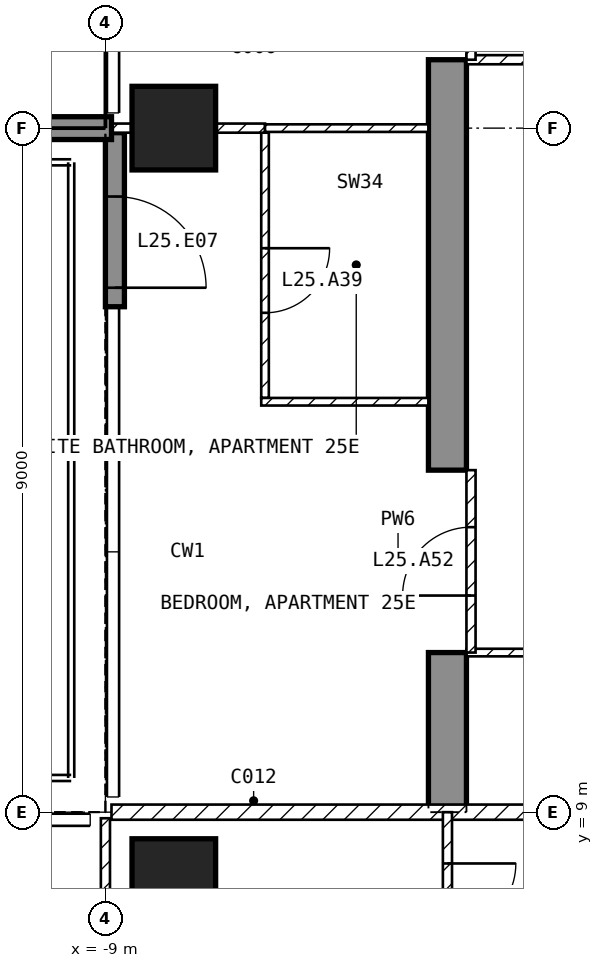
"""IFC4 building model, lengths in metres.
Left out: names, types, materials, properties, quantities, classifications, styles, units other than length and angle.
Written with IfcOpenShell. Run it as: python <this file> out.ifc"""

import sys

from ifc_helpers import new_model, si_unit, direction, frame, frame_2d, origin, origin_2d, place, context, subcontext, project, spatial, polyline, rectangle, outline, extrude, element, fill, save


model = new_model("IFC4")
c1 = context("Model", 3, precision=1e-05, world=origin(), true_north=direction((0.0, 1.0)))
c2 = subcontext(c1, "Body", "Model", "MODEL_VIEW")
j1 = project(units=[si_unit("LENGTHUNIT", "METRE"), si_unit("PLANEANGLEUNIT", "RADIAN")], contexts=[c1])
p1 = place(None, origin())
s1 = spatial("IfcSite", under=j1, at=p1, CompositionType="ELEMENT")
p2 = place(p1, origin())
s2 = spatial("IfcBuilding", under=s1, at=p2, CompositionType="ELEMENT")
p3 = place(p2, frame((0.0, 0.0, 109.4)))
s3 = spatial("IfcBuildingStorey", under=s2, at=p3, CompositionType="ELEMENT", Elevation=109.4)
for number, where, z_axis, x_axis in (
    (1, (-8.1, 8.1, -0.25), (0.0, 0.0, 1.0), (1.0, 0.0, 0.0)),
    (2, (-8.1, 18.0, -0.25), (0.0, 0.0, 1.0), (1.0, 0.0, 0.0)),
):
    element("IfcColumn", number, at=place(p3, frame(where, z_axis=z_axis, x_axis=x_axis)), inside=s3, PredefinedType="COLUMN", context=c2, shape_type="SweptSolid", body=[
        extrude(rectangle(XDim=1.1, YDim=1.1, at=origin_2d()), origin(), (0.0, 0.0, 1.0), 3.5),
    ])
p4 = place(p3, frame((-4.75, 9.0, -0.25), z_axis=(1.0, 0.0, 0.0), x_axis=(0.0, 1.0, 0.0)))
e3 = element("IfcWall", 3, at=p4, inside=s3, PredefinedType="SHEAR", context=c2, shape_type="SweptSolid", body=[
    extrude(outline(polyline([(0.0, 0.0), (2.1, 0.0), (2.1, 2.65), (4.5, 2.65), (4.5, 0.0), (9.9, 0.0), (9.9, 2.65), (12.3, 2.65), (12.3, 0.0), (16.55, 0.0), (16.55, 3.5), (0.0, 3.5), (0.0, 0.0)])), origin(), (0.0, 0.0, 1.0), 0.5),
])
p5 = place(p3, frame((-8.875, 17.94, 0.0), z_axis=(0.0, 0.0, 1.0), x_axis=(0.0, -1.0, 0.0)))
e4 = element("IfcWall", 4, at=p5, inside=s3, PredefinedType="SOLIDWALL", context=c2, shape_type="SweptSolid", body=[
    extrude(rectangle(XDim=2.29, YDim=0.25, at=frame_2d((1.145, 0.0))), origin(), (0.0, 0.0, 1.0), 3.25),
])
p6 = place(p5, frame((0.84, 0.0, 0.0)))
e5 = element("IfcOpeningElement", 5, at=p6, cuts=e4, PredefinedType="OPENING", context=c2, shape_type="SweptSolid", body=[
    extrude(rectangle(XDim=1.2, YDim=2.4, at=frame_2d((0.6, 1.2))), frame((0.0, 0.135, 0.0), z_axis=(0.0, -1.0, 0.0), x_axis=(1.0, 0.0, 0.0)), (0.0, 0.0, 1.0), 0.27),
])
p7 = place(p3, frame((-8.92, 18.0, 0.0), z_axis=(0.0, 0.0, 1.0), x_axis=(-1.0, 0.0, 0.0)))
e6 = element("IfcWall", 6, at=p7, inside=s3, PredefinedType="SOLIDWALL", context=c2, shape_type="SweptSolid", body=[
    extrude(rectangle(XDim=2.82, YDim=0.3, at=frame_2d((1.41, 0.0))), origin(), (0.0, 0.0, 1.0), 3.25),
])
p8 = place(p3, frame((-8.92, 9.0, 0.0), z_axis=(0.0, 0.0, 1.0), x_axis=(1.0, 0.0, 0.0)))
e7 = element("IfcWall", 7, at=p8, inside=s3, PredefinedType="PARTITIONING", context=c2, shape_type="SweptSolid", body=[
    extrude(rectangle(XDim=17.84, YDim=0.2, at=frame_2d((8.92, 0.0))), origin(), (0.0, 0.0, 1.0), 3.25),
])
p9 = place(p8, frame((8.42, 0.0, 0.0)))
e8 = element("IfcOpeningElement", 8, at=p9, cuts=e7, PredefinedType="OPENING", context=c2, shape_type="SweptSolid", body=[
    extrude(rectangle(XDim=1.0, YDim=2.1, at=frame_2d((0.5, 1.05))), frame((0.0, 0.11, 0.0), z_axis=(0.0, -1.0, 0.0), x_axis=(1.0, 0.0, 0.0)), (0.0, 0.0, 1.0), 0.22),
])
p10 = place(p3, frame((-9.0, 8.92, 0.0), z_axis=(0.0, 0.0, 1.0), x_axis=(0.0, -1.0, 0.0)))
e9 = element("IfcWall", 9, at=p10, inside=s3, PredefinedType="PARTITIONING", context=c2, shape_type="SweptSolid", body=[
    extrude(rectangle(XDim=7.62, YDim=0.12, at=frame_2d((3.81, 0.0))), origin(), (0.0, 0.0, 1.0), 3.25),
])
p11 = place(p10, frame((2.62, 0.0, 0.0)))
e10 = element("IfcOpeningElement", 10, at=p11, cuts=e9, PredefinedType="OPENING", context=c2, shape_type="SweptSolid", body=[
    extrude(rectangle(XDim=0.9, YDim=2.1, at=frame_2d((0.45, 1.05))), frame((0.0, 0.07, 0.0), z_axis=(0.0, -1.0, 0.0), x_axis=(1.0, 0.0, 0.0)), (0.0, 0.0, 1.0), 0.14),
])
p12 = place(p3, frame((-4.5, 9.0, 0.0), z_axis=(0.0, 0.0, 1.0), x_axis=(0.0, -1.0, 0.0)))
e11 = element("IfcWall", 11, at=p12, inside=s3, PredefinedType="PARTITIONING", context=c2, shape_type="SweptSolid", body=[
    extrude(rectangle(XDim=2.25, YDim=0.12, at=frame_2d((1.125, 0.0))), origin(), (0.0, 0.0, 1.0), 3.25),
])
p13 = place(p12, frame((0.675, 0.0, 0.0)))
e12 = element("IfcOpeningElement", 12, at=p13, cuts=e11, PredefinedType="OPENING", context=c2, shape_type="SweptSolid", body=[
    extrude(rectangle(XDim=0.9, YDim=2.1, at=frame_2d((0.45, 1.05))), frame((0.0, 0.07, 0.0), z_axis=(0.0, -1.0, 0.0), x_axis=(1.0, 0.0, 0.0)), (0.0, 0.0, 1.0), 0.14),
])
p14 = place(p3, frame((-4.25, 11.1, 0.0), z_axis=(0.0, 0.0, 1.0), x_axis=(1.0, 0.0, 0.0)))
e13 = element("IfcWall", 13, at=p14, inside=s3, PredefinedType="PARTITIONING", context=c2, shape_type="SweptSolid", body=[
    extrude(rectangle(XDim=2.15, YDim=0.1, at=frame_2d((1.075, 0.0))), origin(), (0.0, 0.0, 1.0), 3.25),
])
p15 = place(p3, frame((-4.25, 18.9, 0.0), z_axis=(0.0, 0.0, 1.0), x_axis=(1.0, 0.0, 0.0)))
e14 = element("IfcWall", 14, at=p15, inside=s3, PredefinedType="PARTITIONING", context=c2, shape_type="SweptSolid", body=[
    extrude(rectangle(XDim=8.5, YDim=0.12, at=frame_2d((4.25, 0.0))), origin(), (0.0, 0.0, 1.0), 3.25),
])
p16 = place(p15, frame((5.675, 0.0, 0.0)))
e15 = element("IfcOpeningElement", 15, at=p16, cuts=e14, PredefinedType="OPENING", context=c2, shape_type="SweptSolid", body=[
    extrude(rectangle(XDim=0.9, YDim=2.1, at=frame_2d((0.45, 1.05))), frame((0.0, 0.07, 0.0), z_axis=(0.0, -1.0, 0.0), x_axis=(1.0, 0.0, 0.0)), (0.0, 0.0, 1.0), 0.14),
])
p17 = place(p3, frame((-6.9, 17.94, 0.0), z_axis=(0.0, 0.0, 1.0), x_axis=(0.0, -1.0, 0.0)))
e16 = element("IfcWall", 16, at=p17, inside=s3, PredefinedType="PARTITIONING", context=c2, shape_type="SweptSolid", body=[
    extrude(rectangle(XDim=3.49, YDim=0.1, at=frame_2d((1.745, 0.0))), origin(), (0.0, 0.0, 1.0), 3.25),
])
p18 = place(p17, frame((1.52, 0.0, 0.0)))
e17 = element("IfcOpeningElement", 17, at=p18, cuts=e16, PredefinedType="OPENING", context=c2, shape_type="SweptSolid", body=[
    extrude(rectangle(XDim=0.85, YDim=2.1, at=frame_2d((0.425, 1.05))), frame((0.0, 0.06, 0.0), z_axis=(0.0, -1.0, 0.0), x_axis=(1.0, 0.0, 0.0)), (0.0, 0.0, 1.0), 0.12),
])
p19 = place(p3, frame((-6.95, 14.4, 0.0), z_axis=(0.0, 0.0, 1.0), x_axis=(1.0, 0.0, 0.0)))
e18 = element("IfcWall", 18, at=p19, inside=s3, PredefinedType="PARTITIONING", context=c2, shape_type="SweptSolid", body=[
    extrude(rectangle(XDim=2.2, YDim=0.1, at=frame_2d((1.1, 0.0))), origin(), (0.0, 0.0, 1.0), 3.25),
])
p20 = place(p3, frame((-8.92, 18.0, 0.0), z_axis=(0.0, 0.0, 1.0), x_axis=(1.0, 0.0, 0.0)))
e19 = element("IfcWall", 19, at=p20, inside=s3, PredefinedType="PARTITIONING", context=c2, shape_type="SweptSolid", body=[
    extrude(rectangle(XDim=2.02, YDim=0.12, at=frame_2d((1.01, 0.0))), origin(), (0.0, 0.0, 1.0), 2.414),
])
p21 = place(p3, frame((-6.9, 18.0, 0.0), z_axis=(0.0, 0.0, 1.0), x_axis=(1.0, 0.0, 0.0)))
e20 = element("IfcWall", 20, at=p21, inside=s3, PredefinedType="PARTITIONING", context=c2, shape_type="SweptSolid", body=[
    extrude(rectangle(XDim=2.15, YDim=0.1, at=frame_2d((1.075, 0.0))), origin(), (0.0, 0.0, 1.0), 2.414),
])
p22 = place(p3, frame((-4.19, 11.1, 0.0), z_axis=(0.0, 0.0, 1.0), x_axis=(0.0, 1.0, 0.0)))
e21 = element("IfcWall", 21, at=p22, inside=s3, PredefinedType="PARTITIONING", context=c2, shape_type="SweptSolid", body=[
    extrude(rectangle(XDim=2.4, YDim=0.12, at=frame_2d((1.2, 0.0))), origin(), (0.0, 0.0, 1.0), 2.4),
])
p23 = place(p22, frame((0.75, 0.0, 0.0)))
e22 = element("IfcOpeningElement", 22, at=p23, cuts=e21, PredefinedType="OPENING", context=c2, shape_type="SweptSolid", body=[
    extrude(rectangle(XDim=0.9, YDim=2.1, at=frame_2d((0.45, 1.05))), frame((0.0, 0.07, 0.0), z_axis=(0.0, -1.0, 0.0), x_axis=(1.0, 0.0, 0.0)), (0.0, 0.0, 1.0), 0.14),
])
p24 = place(p3, frame((-4.19, 18.9, 0.0), z_axis=(0.0, 0.0, 1.0), x_axis=(0.0, 1.0, 0.0)))
e23 = element("IfcWall", 23, at=p24, inside=s3, PredefinedType="PARTITIONING", context=c2, shape_type="SweptSolid", body=[
    extrude(rectangle(XDim=2.4, YDim=0.12, at=frame_2d((1.2, 0.0))), origin(), (0.0, 0.0, 1.0), 2.4),
])
p25 = place(p24, frame((0.75, 0.0, 0.0)))
e24 = element("IfcOpeningElement", 24, at=p25, cuts=e23, PredefinedType="OPENING", context=c2, shape_type="SweptSolid", body=[
    extrude(rectangle(XDim=0.9, YDim=2.1, at=frame_2d((0.45, 1.05))), frame((0.0, 0.07, 0.0), z_axis=(0.0, -1.0, 0.0), x_axis=(1.0, 0.0, 0.0)), (0.0, 0.0, 1.0), 0.14),
])
p26 = place(p6, origin())
e25 = element("IfcDoor", 25, at=p26, inside=s3, OperationType="SINGLE_SWING_RIGHT", PredefinedType="DOOR", context=c2, shape_type="SweptSolid", body=[
    extrude(rectangle(XDim=1.2, YDim=2.4, at=frame_2d((0.6, 1.2))), frame((0.0, 0.025, 0.0), z_axis=(0.0, -1.0, 0.0), x_axis=(1.0, 0.0, 0.0)), (0.0, 0.0, 1.0), 0.05),
])
fill(e5, e25)
p27 = place(p13, origin())
e26 = element("IfcDoor", 26, at=p27, inside=s3, OperationType="SINGLE_SWING_LEFT", PredefinedType="DOOR", context=c2, shape_type="SweptSolid", body=[
    extrude(rectangle(XDim=0.9, YDim=2.1, at=frame_2d((0.45, 1.05))), frame((0.0, 0.025, 0.0), z_axis=(0.0, -1.0, 0.0), x_axis=(1.0, 0.0, 0.0)), (0.0, 0.0, 1.0), 0.05),
])
fill(e12, e26)
p28 = place(p18, origin())
e27 = element("IfcDoor", 27, at=p28, inside=s3, OperationType="SINGLE_SWING_LEFT", PredefinedType="DOOR", context=c2, shape_type="SweptSolid", body=[
    extrude(rectangle(XDim=0.85, YDim=2.1, at=frame_2d((0.425, 1.05))), frame((0.0, 0.025, 0.0), z_axis=(0.0, -1.0, 0.0), x_axis=(1.0, 0.0, 0.0)), (0.0, 0.0, 1.0), 0.05),
])
fill(e17, e27)
p29 = place(p23, origin())
e28 = element("IfcDoor", 28, at=p29, inside=s3, OperationType="SINGLE_SWING_LEFT", PredefinedType="DOOR", context=c2, shape_type="SweptSolid", body=[
    extrude(rectangle(XDim=0.9, YDim=2.1, at=frame_2d((0.45, 1.05))), frame((0.0, 0.025, 0.0), z_axis=(0.0, -1.0, 0.0), x_axis=(1.0, 0.0, 0.0)), (0.0, 0.0, 1.0), 0.05),
])
fill(e22, e28)
save(model, sys.argv[1])
